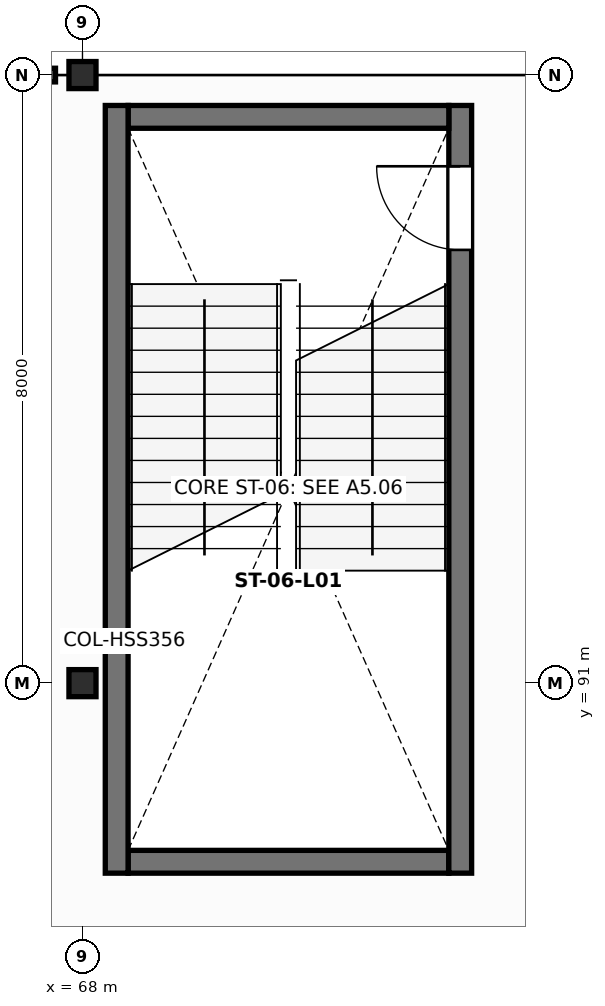
"""IFC4 building model, lengths in metres.
Left out: names, types, materials, properties, quantities, classifications, styles, units other than length and angle.
Written with IfcOpenShell. Run it as: python <this file> out.ifc"""

import sys

from ifc_helpers import new_model, si_unit, direction, frame, frame_2d, origin, origin_2d, place, context, subcontext, project, spatial, rectangle, hollow_rectangle, extrude, element, fill, save


model = new_model("IFC4")
c1 = context("Model", 3, precision=1e-05, world=origin(), true_north=direction((0.0, 1.0)))
c2 = subcontext(c1, "Body", "Model", "MODEL_VIEW")
j1 = project(units=[si_unit("LENGTHUNIT", "METRE"), si_unit("PLANEANGLEUNIT", "RADIAN")], contexts=[c1])
p1 = place(None, origin())
s1 = spatial("IfcSite", under=j1, at=p1, CompositionType="ELEMENT")
p2 = place(p1, origin())
s2 = spatial("IfcBuilding", under=s1, at=p2, CompositionType="ELEMENT")
p3 = place(p2, frame((0.0, 0.0, 6.0)))
s3 = spatial("IfcBuildingStorey", under=s2, at=p3, CompositionType="ELEMENT", Elevation=6.0)
for number, where, z_axis, x_axis in (
    (1, (68.0, 91.0, 0.0), (0.0, 0.0, 1.0), (1.0, 0.0, 0.0)),
    (2, (68.0, 99.0, 0.0), (0.0, 0.0, 1.0), (1.0, 0.0, 0.0)),
):
    element("IfcColumn", number, at=place(p3, frame(where, z_axis=z_axis, x_axis=x_axis)), inside=s3, PredefinedType="COLUMN", context=c2, shape_type="SweptSolid", body=[
        extrude(hollow_rectangle(XDim=0.356, YDim=0.356, WallThickness=0.015, at=origin_2d()), origin(), (0.0, 0.0, 1.0), 5.2),
    ])
p4 = place(p3, frame((68.6, 88.65, 0.0), z_axis=(0.0, 0.0, 1.0), x_axis=(1.0, 0.0, 0.0)))
e3 = element("IfcWall", 3, at=p4, inside=s3, PredefinedType="SHEAR", context=c2, shape_type="SweptSolid", body=[
    extrude(rectangle(XDim=4.22, YDim=0.3, at=frame_2d((2.11, 0.0))), origin(), (0.0, 0.0, 1.0), 4.945),
])
p5 = place(p3, frame((72.97, 88.5, 0.0), z_axis=(0.0, 0.0, 1.0), x_axis=(0.0, 1.0, 0.0)))
e4 = element("IfcWall", 4, at=p5, inside=s3, PredefinedType="SHEAR", context=c2, shape_type="SweptSolid", body=[
    extrude(rectangle(XDim=10.1, YDim=0.3, at=frame_2d((5.05, 0.0))), origin(), (0.0, 0.0, 1.0), 4.945),
])
p6 = place(p5, frame((8.2, 0.0, 0.0)))
e5 = element("IfcOpeningElement", 5, at=p6, cuts=e4, PredefinedType="OPENING", context=c2, shape_type="SweptSolid", body=[
    extrude(rectangle(XDim=1.1, YDim=2.15, at=frame_2d((0.55, 1.075))), frame((0.0, 0.16, 0.0), z_axis=(0.0, -1.0, 0.0), x_axis=(1.0, 0.0, 0.0)), (0.0, 0.0, 1.0), 0.32),
])
p7 = place(p3, frame((72.82, 98.45, 0.0), z_axis=(0.0, 0.0, 1.0), x_axis=(-1.0, 0.0, 0.0)))
e6 = element("IfcWall", 6, at=p7, inside=s3, PredefinedType="SHEAR", context=c2, shape_type="SweptSolid", body=[
    extrude(rectangle(XDim=4.22, YDim=0.3, at=frame_2d((2.11, 0.0))), origin(), (0.0, 0.0, 1.0), 4.945),
])
p8 = place(p3, frame((68.45, 98.6, 0.0), z_axis=(0.0, 0.0, 1.0), x_axis=(0.0, -1.0, 0.0)))
e7 = element("IfcWall", 7, at=p8, inside=s3, PredefinedType="SHEAR", context=c2, shape_type="SweptSolid", body=[
    extrude(rectangle(XDim=10.1, YDim=0.3, at=frame_2d((5.05, 0.0))), origin(), (0.0, 0.0, 1.0), 4.945),
])
p9 = place(p6, origin())
e8 = element("IfcDoor", 8, at=p9, inside=s3, OperationType="SINGLE_SWING_RIGHT", PredefinedType="DOOR", context=c2, shape_type="SweptSolid", body=[
    extrude(rectangle(XDim=1.1, YDim=2.15, at=frame_2d((0.55, 1.075))), frame((0.0, 0.025, 0.0), z_axis=(0.0, -1.0, 0.0), x_axis=(1.0, 0.0, 0.0)), (0.0, 0.0, 1.0), 0.05),
])
fill(e5, e8)
save(model, sys.argv[1])
